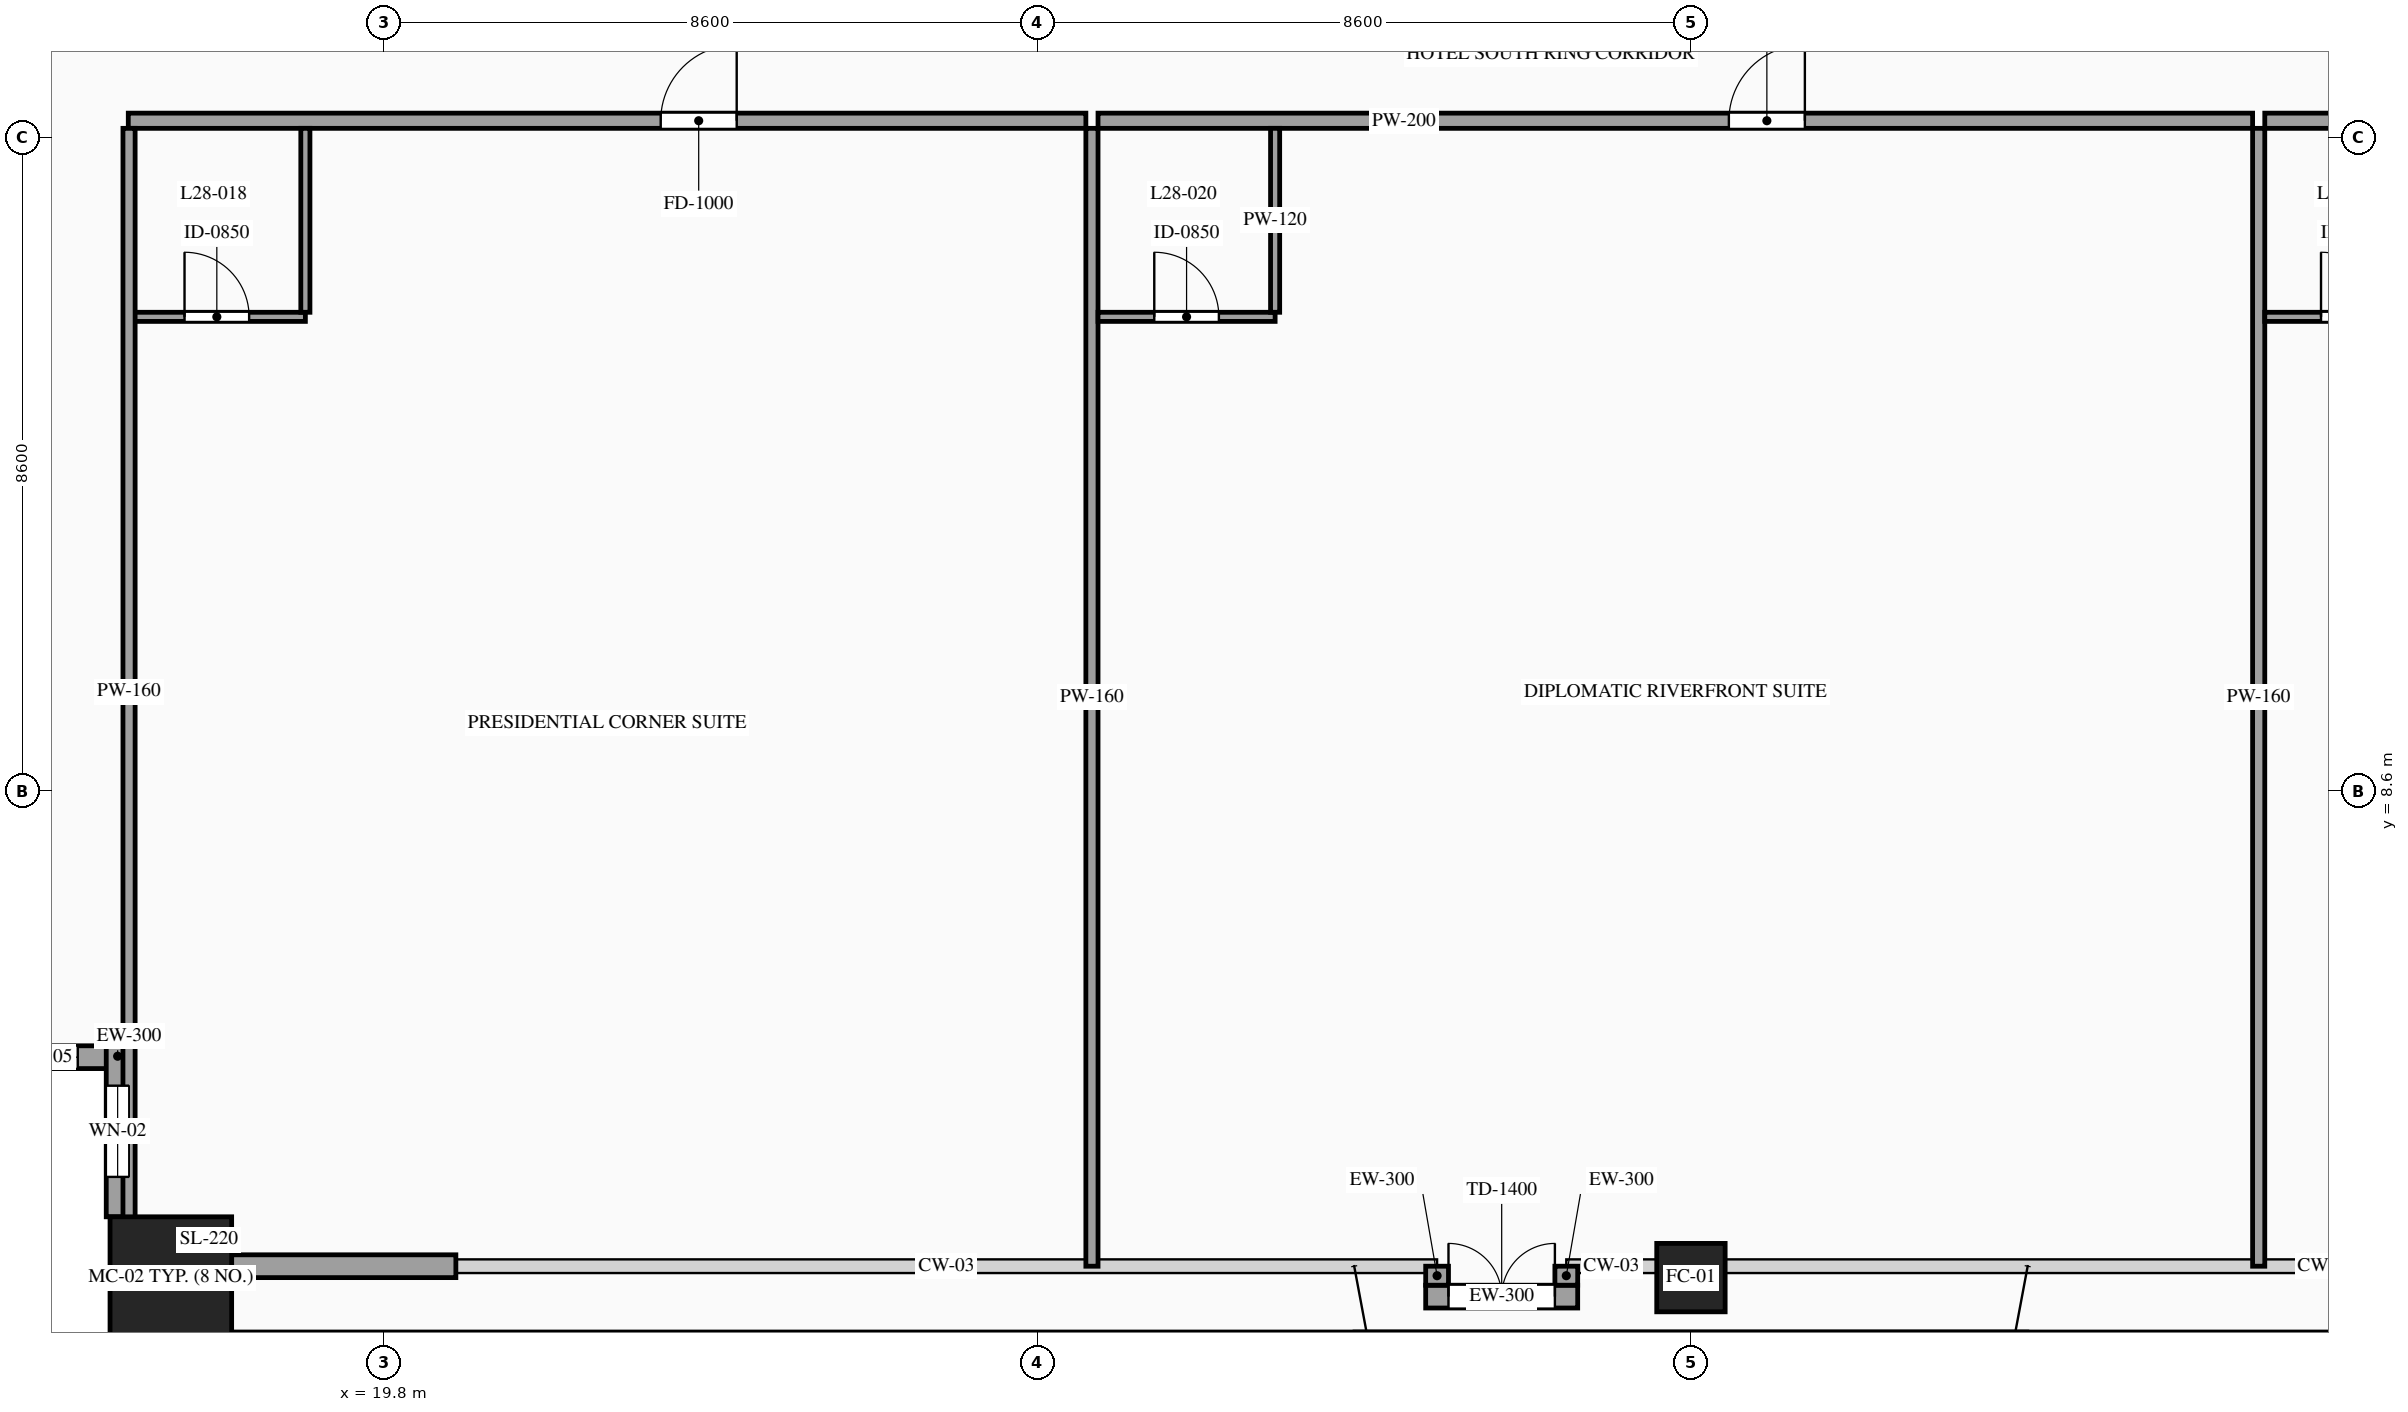
"""IFC4 building model, lengths in metres.
Left out: names, types, materials, properties, quantities, classifications, styles, units other than length and angle.
Written with IfcOpenShell. Run it as: python <this file> out.ifc"""

import sys

from ifc_helpers import new_model, si_unit, direction, frame, frame_2d, origin, origin_2d, place, context, subcontext, project, spatial, rectangle, hollow_rectangle, extrude, source, transform, mapped, element, fill, save


model = new_model("IFC4")
c1 = context("Model", 3, precision=1e-05, world=origin(), true_north=direction((0.0, 1.0)))
c2 = subcontext(c1, "Body", "Model", "MODEL_VIEW")
j1 = project(units=[si_unit("LENGTHUNIT", "METRE"), si_unit("PLANEANGLEUNIT", "RADIAN")], contexts=[c1])
p1 = place(None, origin())
s1 = spatial("IfcSite", under=j1, at=p1, CompositionType="ELEMENT")
p2 = place(p1, origin())
s2 = spatial("IfcBuilding", under=s1, at=p2, CompositionType="ELEMENT")
p3 = place(p2, frame((0.0, 0.0, 108.2)))
s3 = spatial("IfcBuildingStorey", under=s2, at=p3, CompositionType="ELEMENT", Elevation=108.2)
m1 = source(origin(), c2, "Body", "SweptSolid", [
    extrude(hollow_rectangle(XDim=1.6, YDim=1.6, WallThickness=0.07, at=origin_2d()), origin(), (0.0, 0.0, 1.0), 3.6),
])
p4 = place(p3, frame((17.0, 2.2, 0.0), z_axis=(0.0, 0.0, 1.0), x_axis=(1.0, 0.0, 0.0)))
e1 = element("IfcColumn", 1, at=p4, inside=s3, PredefinedType="COLUMN", context=c2, shape_type="MappedRepresentation", body=[
    mapped(m1, transform((0.0, 0.0, 0.0), scale=1.0)),
])
m2 = source(origin(), c2, "Body", "SweptSolid", [
    extrude(hollow_rectangle(XDim=0.9, YDim=0.9, WallThickness=0.042, at=origin_2d()), origin(), (0.0, 0.0, 1.0), 3.6),
])
p5 = place(p3, frame((37.0, 2.2, 0.0), z_axis=(0.0, 0.0, 1.0), x_axis=(1.0, 0.0, 0.0)))
e2 = element("IfcColumn", 2, at=p5, inside=s3, PredefinedType="COLUMN", context=c2, shape_type="MappedRepresentation", body=[
    mapped(m2, transform((0.0, 0.0, 0.0), scale=1.0)),
])
p6 = place(p3, frame((14.2, 5.1, 0.0), z_axis=(0.0, 0.0, 1.0), x_axis=(1.0, 0.0, 0.0)))
e3 = element("IfcWall", 3, at=p6, inside=s3, PredefinedType="SOLIDWALL", context=c2, shape_type="SweptSolid", body=[
    extrude(rectangle(XDim=2.25, YDim=0.3, at=frame_2d((1.125, 0.0))), origin(), (0.0, 0.0, 1.0), 3.38),
])
p7 = place(p6, frame((0.675, 0.0, 0.85)))
e4 = element("IfcOpeningElement", 4, at=p7, cuts=e3, PredefinedType="OPENING", context=c2, shape_type="SweptSolid", body=[
    extrude(rectangle(XDim=0.9, YDim=1.5, at=frame_2d((0.45, 0.75))), frame((0.0, 0.165, 0.0), z_axis=(0.0, -1.0, 0.0), x_axis=(1.0, 0.0, 0.0)), (0.0, 0.0, 1.0), 0.33),
])
p8 = place(p3, frame((16.3, 5.25, 0.0), z_axis=(0.0, 0.0, 1.0), x_axis=(0.0, -1.0, 0.0)))
e5 = element("IfcWall", 5, at=p8, inside=s3, PredefinedType="SOLIDWALL", context=c2, shape_type="SweptSolid", body=[
    extrude(rectangle(XDim=2.25, YDim=0.3, at=frame_2d((1.125, 0.0))), origin(), (0.0, 0.0, 1.0), 3.38),
])
p9 = place(p8, frame((0.525, 0.0, 0.85)))
e6 = element("IfcOpeningElement", 6, at=p9, cuts=e5, PredefinedType="OPENING", context=c2, shape_type="SweptSolid", body=[
    extrude(rectangle(XDim=1.2, YDim=2.1, at=frame_2d((0.6, 1.05))), frame((0.0, 0.165, 0.0), z_axis=(0.0, -1.0, 0.0), x_axis=(1.0, 0.0, 0.0)), (0.0, 0.0, 1.0), 0.33),
])
m3 = source(origin(), c2, "Body", "SweptSolid", [
    extrude(rectangle(XDim=2.95, YDim=0.3, at=frame_2d((1.475, 0.0))), origin(), (0.0, 0.0, 1.0), 2.775),
])
p10 = place(p3, frame((17.8, 2.35, 0.0), z_axis=(0.0, 0.0, 1.0), x_axis=(1.0, 0.0, 0.0)))
e7 = element("IfcWall", 7, at=p10, inside=s3, PredefinedType="SOLIDWALL", context=c2, shape_type="MappedRepresentation", body=[
    mapped(m3, transform((0.0, 0.0, 0.0), scale=1.0)),
])
p11 = place(p3, frame((33.51, 1.95, 0.0), z_axis=(0.0, 0.0, 1.0), x_axis=(1.0, 0.0, 0.0)))
e8 = element("IfcWall", 8, at=p11, inside=s3, PredefinedType="SOLIDWALL", context=c2, shape_type="SweptSolid", body=[
    extrude(rectangle(XDim=2.0, YDim=0.3, at=frame_2d((1.0, 0.0))), origin(), (0.0, 0.0, 1.0), 3.38),
])
p12 = place(p11, frame((0.3, 0.0, 0.0)))
e9 = element("IfcOpeningElement", 9, at=p12, cuts=e8, PredefinedType="OPENING", context=c2, shape_type="SweptSolid", body=[
    extrude(rectangle(XDim=1.4, YDim=2.3, at=frame_2d((0.7, 1.15))), frame((0.0, 0.165, 0.0), z_axis=(0.0, -1.0, 0.0), x_axis=(1.0, 0.0, 0.0)), (0.0, 0.0, 1.0), 0.33),
])
m4 = source(origin(), c2, "Body", "SweptSolid", [
    extrude(rectangle(XDim=0.25, YDim=0.3, at=frame_2d((0.125, 0.0))), origin(), (0.0, 0.0, 1.0), 3.38),
])
for number, where, z_axis, x_axis in (
    (10, (33.66, 2.35, 0.0), (0.0, 0.0, 1.0), (0.0, -1.0, 0.0)),
    (11, (35.36, 2.1, 0.0), (0.0, 0.0, 1.0), (0.0, 1.0, 0.0)),
):
    element("IfcWall", number, at=place(p3, frame(where, z_axis=z_axis, x_axis=x_axis)), inside=s3, PredefinedType="SOLIDWALL", context=c2, shape_type="MappedRepresentation", body=[
        mapped(m4, transform((0.0, 0.0, 0.0), scale=1.0)),
    ])
p13 = place(p3, frame((16.44, 17.42, 0.0), z_axis=(0.0, 0.0, 1.0), x_axis=(1.0, 0.0, 0.0)))
e12 = element("IfcWall", 12, at=p13, inside=s3, PredefinedType="PARTITIONING", context=c2, shape_type="SweptSolid", body=[
    extrude(rectangle(XDim=12.599, YDim=0.2, at=frame_2d((6.3, 0.0))), origin(), (0.0, 0.0, 1.0), 3.38),
])
p14 = place(p13, frame((7.005, 0.0, 0.0)))
e13 = element("IfcOpeningElement", 13, at=p14, cuts=e12, PredefinedType="OPENING", context=c2, shape_type="SweptSolid", body=[
    extrude(rectangle(XDim=1.0, YDim=2.2, at=frame_2d((0.5, 1.1))), frame((0.0, 0.115, 0.0), z_axis=(0.0, -1.0, 0.0), x_axis=(1.0, 0.0, 0.0)), (0.0, 0.0, 1.0), 0.23),
])
m5 = source(origin(), c2, "Body", "SweptSolid", [
    extrude(rectangle(XDim=14.97, YDim=0.16, at=frame_2d((7.485, 0.0))), origin(), (0.0, 0.0, 1.0), 3.38),
])
p15 = place(p3, frame((29.119, 2.35, 0.0), z_axis=(0.0, 0.0, 1.0), x_axis=(0.0, 1.0, 0.0)))
e14 = element("IfcWall", 14, at=p15, inside=s3, PredefinedType="PARTITIONING", context=c2, shape_type="MappedRepresentation", body=[
    mapped(m5, transform((0.0, 0.0, 0.0), scale=1.0)),
])
p16 = place(p3, frame((16.44, 14.84, 0.0), z_axis=(0.0, 0.0, 1.0), x_axis=(1.0, 0.0, 0.0)))
e15 = element("IfcWall", 15, at=p16, inside=s3, PredefinedType="PARTITIONING", context=c2, shape_type="SweptSolid", body=[
    extrude(rectangle(XDim=2.33, YDim=0.12, at=frame_2d((1.165, 0.0))), origin(), (0.0, 0.0, 1.0), 3.38),
])
p17 = place(p16, frame((0.74, 0.0, 0.0)))
e16 = element("IfcOpeningElement", 16, at=p17, cuts=e15, PredefinedType="OPENING", context=c2, shape_type="SweptSolid", body=[
    extrude(rectangle(XDim=0.85, YDim=2.1, at=frame_2d((0.425, 1.05))), frame((0.0, 0.075, 0.0), z_axis=(0.0, -1.0, 0.0), x_axis=(1.0, 0.0, 0.0)), (0.0, 0.0, 1.0), 0.15),
])
m6 = source(origin(), c2, "Body", "SweptSolid", [
    extrude(rectangle(XDim=2.42, YDim=0.12, at=frame_2d((1.21, 0.0))), origin(), (0.0, 0.0, 1.0), 3.38),
])
p18 = place(p3, frame((18.77, 14.9, 0.0), z_axis=(0.0, 0.0, 1.0), x_axis=(0.0, 1.0, 0.0)))
e17 = element("IfcWall", 17, at=p18, inside=s3, PredefinedType="PARTITIONING", context=c2, shape_type="MappedRepresentation", body=[
    mapped(m6, transform((0.0, 0.0, 0.0), scale=1.0)),
])
p19 = place(p3, frame((29.199, 17.42, 0.0), z_axis=(0.0, 0.0, 1.0), x_axis=(1.0, 0.0, 0.0)))
e18 = element("IfcWall", 18, at=p19, inside=s3, PredefinedType="PARTITIONING", context=c2, shape_type="SweptSolid", body=[
    extrude(rectangle(XDim=15.191, YDim=0.2, at=frame_2d((7.595, 0.0))), origin(), (0.0, 0.0, 1.0), 3.38),
])
p20 = place(p19, frame((8.3, 0.0, 0.0)))
e19 = element("IfcOpeningElement", 19, at=p20, cuts=e18, PredefinedType="OPENING", context=c2, shape_type="SweptSolid", body=[
    extrude(rectangle(XDim=1.0, YDim=2.2, at=frame_2d((0.5, 1.1))), frame((0.0, 0.115, 0.0), z_axis=(0.0, -1.0, 0.0), x_axis=(1.0, 0.0, 0.0)), (0.0, 0.0, 1.0), 0.23),
])
p21 = place(p3, frame((44.47, 2.35, 0.0), z_axis=(0.0, 0.0, 1.0), x_axis=(0.0, 1.0, 0.0)))
e20 = element("IfcWall", 20, at=p21, inside=s3, PredefinedType="PARTITIONING", context=c2, shape_type="MappedRepresentation", body=[
    mapped(m5, transform((0.0, 0.0, 0.0), scale=1.0)),
])
p22 = place(p3, frame((29.199, 14.84, 0.0), z_axis=(0.0, 0.0, 1.0), x_axis=(1.0, 0.0, 0.0)))
e21 = element("IfcWall", 21, at=p22, inside=s3, PredefinedType="PARTITIONING", context=c2, shape_type="SweptSolid", body=[
    extrude(rectangle(XDim=2.33, YDim=0.12, at=frame_2d((1.165, 0.0))), origin(), (0.0, 0.0, 1.0), 3.38),
])
p23 = place(p22, frame((0.74, 0.0, 0.0)))
e22 = element("IfcOpeningElement", 22, at=p23, cuts=e21, PredefinedType="OPENING", context=c2, shape_type="SweptSolid", body=[
    extrude(rectangle(XDim=0.85, YDim=2.1, at=frame_2d((0.425, 1.05))), frame((0.0, 0.075, 0.0), z_axis=(0.0, -1.0, 0.0), x_axis=(1.0, 0.0, 0.0)), (0.0, 0.0, 1.0), 0.15),
])
p24 = place(p3, frame((31.529, 14.9, 0.0), z_axis=(0.0, 0.0, 1.0), x_axis=(0.0, 1.0, 0.0)))
e23 = element("IfcWall", 23, at=p24, inside=s3, PredefinedType="PARTITIONING", context=c2, shape_type="MappedRepresentation", body=[
    mapped(m6, transform((0.0, 0.0, 0.0), scale=1.0)),
])
p25 = place(p3, frame((44.55, 17.42, 0.0), z_axis=(0.0, 0.0, 1.0), x_axis=(1.0, 0.0, 0.0)))
e24 = element("IfcWall", 24, at=p25, inside=s3, PredefinedType="PARTITIONING", context=c2, shape_type="SweptSolid", body=[
    extrude(rectangle(XDim=13.01, YDim=0.2, at=frame_2d((6.505, 0.0))), origin(), (0.0, 0.0, 1.0), 3.38),
])
p26 = place(p25, frame((7.21, 0.0, 0.0)))
e25 = element("IfcOpeningElement", 25, at=p26, cuts=e24, PredefinedType="OPENING", context=c2, shape_type="SweptSolid", body=[
    extrude(rectangle(XDim=1.0, YDim=2.2, at=frame_2d((0.5, 1.1))), frame((0.0, 0.115, 0.0), z_axis=(0.0, -1.0, 0.0), x_axis=(1.0, 0.0, 0.0)), (0.0, 0.0, 1.0), 0.23),
])
m7 = source(origin(), c2, "Body", "SweptSolid", [
    extrude(rectangle(XDim=14.82, YDim=0.16, at=frame_2d((7.41, 0.0))), origin(), (0.0, 0.0, 1.0), 3.38),
])
p27 = place(p3, frame((16.45, 2.5, 0.0), z_axis=(0.0, 0.0, 1.0), x_axis=(0.0, 1.0, 0.0)))
e26 = element("IfcWall", 26, at=p27, inside=s3, PredefinedType="PARTITIONING", context=c2, shape_type="MappedRepresentation", body=[
    mapped(m7, transform((0.0, 0.0, 0.0), scale=1.0)),
])
p28 = place(p3, frame((44.55, 14.84, 0.0), z_axis=(0.0, 0.0, 1.0), x_axis=(1.0, 0.0, 0.0)))
e27 = element("IfcWall", 27, at=p28, inside=s3, PredefinedType="PARTITIONING", context=c2, shape_type="SweptSolid", body=[
    extrude(rectangle(XDim=2.33, YDim=0.12, at=frame_2d((1.165, 0.0))), origin(), (0.0, 0.0, 1.0), 3.38),
])
p29 = place(p28, frame((0.74, 0.0, 0.0)))
e28 = element("IfcOpeningElement", 28, at=p29, cuts=e27, PredefinedType="OPENING", context=c2, shape_type="SweptSolid", body=[
    extrude(rectangle(XDim=0.85, YDim=2.1, at=frame_2d((0.425, 1.05))), frame((0.0, 0.075, 0.0), z_axis=(0.0, -1.0, 0.0), x_axis=(1.0, 0.0, 0.0)), (0.0, 0.0, 1.0), 0.15),
])
m8 = source(origin(), c2, "Body", "SweptSolid", [
    extrude(rectangle(XDim=0.9, YDim=1.5, at=frame_2d((0.45, 0.75))), frame((0.0, 0.03, 0.0), z_axis=(0.0, -1.0, 0.0), x_axis=(1.0, 0.0, 0.0)), (0.0, 0.0, 1.0), 0.06),
])
p30 = place(p7, origin())
e29 = element("IfcWindow", 29, at=p30, inside=s3, PartitioningType="SINGLE_PANEL", PredefinedType="WINDOW", context=c2, shape_type="MappedRepresentation", body=[
    mapped(m8, transform((0.0, 0.0, 0.0), scale=1.0)),
])
fill(e4, e29)
m9 = source(origin(), c2, "Body", "SweptSolid", [
    extrude(rectangle(XDim=1.2, YDim=2.1, at=frame_2d((0.6, 1.05))), frame((0.0, 0.03, 0.0), z_axis=(0.0, -1.0, 0.0), x_axis=(1.0, 0.0, 0.0)), (0.0, 0.0, 1.0), 0.06),
])
p31 = place(p9, origin())
e30 = element("IfcWindow", 30, at=p31, inside=s3, PartitioningType="SINGLE_PANEL", PredefinedType="WINDOW", context=c2, shape_type="MappedRepresentation", body=[
    mapped(m9, transform((0.0, 0.0, 0.0), scale=1.0)),
])
fill(e6, e30)
m10 = source(origin(), c2, "Body", "SweptSolid", [
    extrude(rectangle(XDim=1.4, YDim=2.3, at=frame_2d((0.7, 1.15))), frame((0.0, 0.025, 0.0), z_axis=(0.0, -1.0, 0.0), x_axis=(1.0, 0.0, 0.0)), (0.0, 0.0, 1.0), 0.05),
])
p32 = place(p12, origin())
e31 = element("IfcDoor", 31, at=p32, inside=s3, OperationType="DOUBLE_DOOR_SINGLE_SWING", PredefinedType="DOOR", context=c2, shape_type="MappedRepresentation", body=[
    mapped(m10, transform((0.0, 0.0, 0.0), scale=1.0)),
])
fill(e9, e31)
m11 = source(origin(), c2, "Body", "SweptSolid", [
    extrude(rectangle(XDim=1.0, YDim=2.2, at=frame_2d((0.5, 1.1))), frame((0.0, 0.025, 0.0), z_axis=(0.0, -1.0, 0.0), x_axis=(1.0, 0.0, 0.0)), (0.0, 0.0, 1.0), 0.05),
])
p33 = place(p14, origin())
e32 = element("IfcDoor", 32, at=p33, inside=s3, OperationType="SINGLE_SWING_RIGHT", PredefinedType="DOOR", context=c2, shape_type="MappedRepresentation", body=[
    mapped(m11, transform((0.0, 0.0, 0.0), scale=1.0)),
])
fill(e13, e32)
m12 = source(origin(), c2, "Body", "SweptSolid", [
    extrude(rectangle(XDim=0.85, YDim=2.1, at=frame_2d((0.425, 1.05))), frame((0.0, 0.025, 0.0), z_axis=(0.0, -1.0, 0.0), x_axis=(1.0, 0.0, 0.0)), (0.0, 0.0, 1.0), 0.05),
])
p34 = place(p17, origin())
e33 = element("IfcDoor", 33, at=p34, inside=s3, OperationType="SINGLE_SWING_LEFT", PredefinedType="DOOR", context=c2, shape_type="MappedRepresentation", body=[
    mapped(m12, transform((0.0, 0.0, 0.0), scale=1.0)),
])
fill(e16, e33)
p35 = place(p20, origin())
e34 = element("IfcDoor", 34, at=p35, inside=s3, OperationType="SINGLE_SWING_RIGHT", PredefinedType="DOOR", context=c2, shape_type="MappedRepresentation", body=[
    mapped(m11, transform((0.0, 0.0, 0.0), scale=1.0)),
])
fill(e19, e34)
p36 = place(p23, origin())
e35 = element("IfcDoor", 35, at=p36, inside=s3, OperationType="SINGLE_SWING_LEFT", PredefinedType="DOOR", context=c2, shape_type="MappedRepresentation", body=[
    mapped(m12, transform((0.0, 0.0, 0.0), scale=1.0)),
])
fill(e22, e35)
p37 = place(p29, origin())
e36 = element("IfcDoor", 36, at=p37, inside=s3, OperationType="SINGLE_SWING_LEFT", PredefinedType="DOOR", context=c2, shape_type="MappedRepresentation", body=[
    mapped(m12, transform((0.0, 0.0, 0.0), scale=1.0)),
])
fill(e28, e36)
save(model, sys.argv[1])
